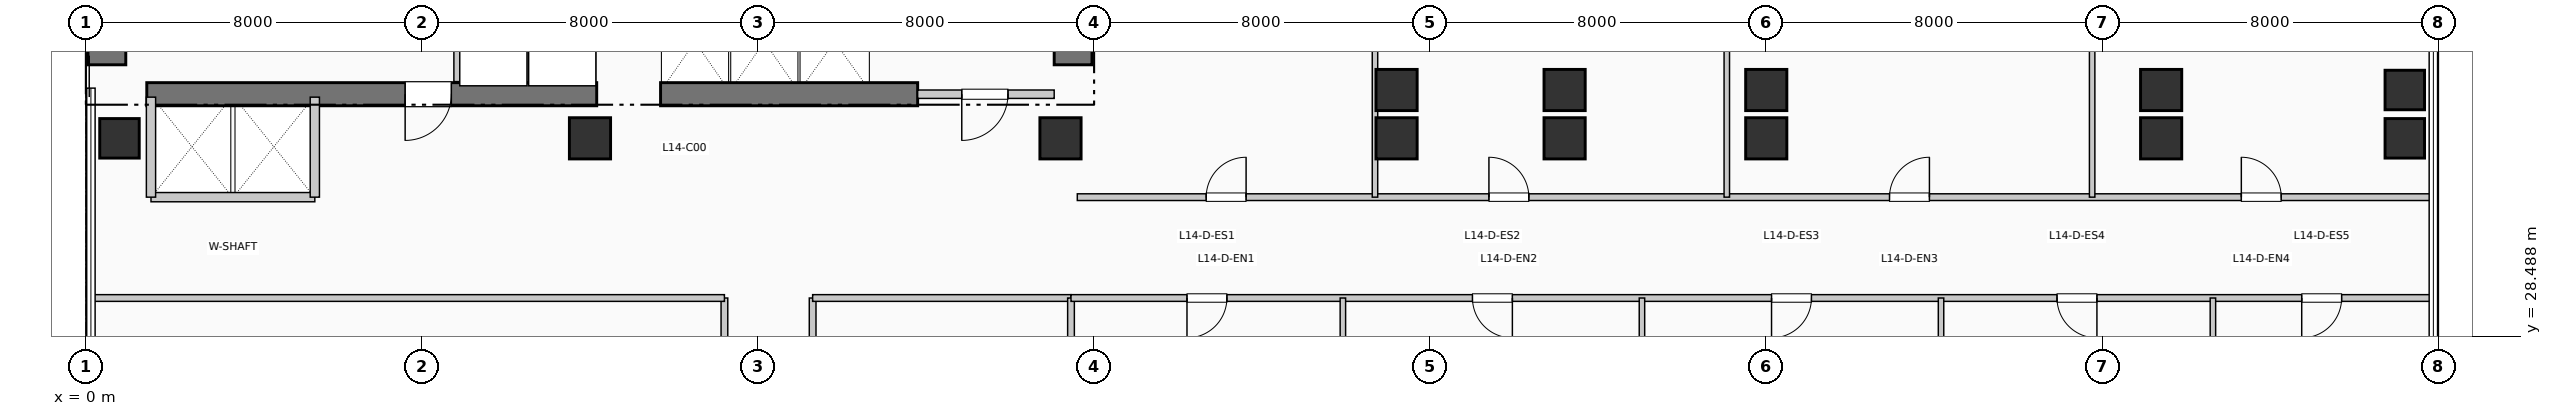
"""IFC4 building model, lengths in metres.
Left out: names, types, materials, properties, quantities, classifications, styles, units other than length and angle.
Written with IfcOpenShell. Run it as: python <this file> out.ifc"""

import sys

from ifc_helpers import new_model, si_unit, direction, frame, frame_2d, origin, origin_2d, place, context, subcontext, project, spatial, rectangle, extrude, element, fill, save


model = new_model("IFC4")
c1 = context("Model", 3, precision=1e-05, world=origin(), true_north=direction((0.0, 1.0)))
c2 = subcontext(c1, "Body", "Model", "MODEL_VIEW")
j1 = project(units=[si_unit("LENGTHUNIT", "METRE"), si_unit("PLANEANGLEUNIT", "RADIAN")], contexts=[c1])
p1 = place(None, origin())
s1 = spatial("IfcSite", under=j1, at=p1, CompositionType="ELEMENT")
p2 = place(p1, origin())
s2 = spatial("IfcBuilding", under=s1, at=p2, CompositionType="ELEMENT")
p3 = place(p2, frame((0.0, 0.0, 62.04)))
s3 = spatial("IfcBuildingStorey", under=s2, at=p3, CompositionType="ELEMENT", Elevation=62.04)
p4 = place(p3, frame((0.5, 34.95, 0.0), z_axis=(0.0, 0.0, 1.0), x_axis=(0.0, 1.0, 0.0)))
e1 = element("IfcWall", 1, at=p4, inside=s3, PredefinedType="SHEAR", context=c2, shape_type="SweptSolid", body=[
    extrude(rectangle(XDim=7.9, YDim=0.9, at=frame_2d((3.95, 0.0))), origin(), (0.0, 0.0, 1.0), 3.96),
])
p5 = place(p3, frame((23.5, 34.95, 0.0), z_axis=(0.0, 0.0, 1.0), x_axis=(0.0, 1.0, 0.0)))
e2 = element("IfcWall", 2, at=p5, inside=s3, PredefinedType="SHEAR", context=c2, shape_type="SweptSolid", body=[
    extrude(rectangle(XDim=10.64, YDim=0.9, at=frame_2d((5.32, 0.0))), origin(), (0.0, 0.0, 1.0), 3.96),
])
p6 = place(p3, frame((1.45, 34.25, 0.0), z_axis=(0.0, 0.0, 1.0), x_axis=(1.0, 0.0, 0.0)))
e3 = element("IfcWall", 3, at=p6, inside=s3, PredefinedType="SHEAR", context=c2, shape_type="SweptSolid", body=[
    extrude(rectangle(XDim=10.71, YDim=0.55, at=frame_2d((5.355, 0.0))), origin(), (0.0, 0.0, 1.0), 3.96),
])
p7 = place(p6, frame((7.25, 0.0, 0.0), z_axis=(0.0, 0.0, 1.0), x_axis=(-1.0, 0.0, 0.0)))
e4 = element("IfcOpeningElement", 4, at=p7, cuts=e3, PredefinedType="OPENING", context=c2, shape_type="SweptSolid", body=[
    extrude(rectangle(XDim=1.1, YDim=2.15, at=frame_2d((0.55, 1.075))), frame((0.0, 0.285, 0.0), z_axis=(0.0, -1.0, 0.0), x_axis=(1.0, 0.0, 0.0)), (0.0, 0.0, 1.0), 0.57),
])
p8 = place(p3, frame((13.68, 34.25, 0.0), z_axis=(0.0, 0.0, 1.0), x_axis=(1.0, 0.0, 0.0)))
e5 = element("IfcWall", 5, at=p8, inside=s3, PredefinedType="SHEAR", context=c2, shape_type="SweptSolid", body=[
    extrude(rectangle(XDim=6.12, YDim=0.55, at=frame_2d((3.06, 0.0))), origin(), (0.0, 0.0, 1.0), 3.96),
])
p9 = place(p3, frame((0.8, 33.2, 0.0), z_axis=(0.0, 0.0, 1.0), x_axis=(1.0, 0.0, 0.0)))
e6 = element("IfcColumn", 6, at=p9, inside=s3, PredefinedType="COLUMN", context=c2, shape_type="SweptSolid", body=[
    extrude(rectangle(XDim=0.94, YDim=0.94, at=origin_2d()), origin(), (0.0, 0.0, 1.0), 3.96),
])
for number, where, z_axis, x_axis in (
    (7, (12.0, 33.2, 0.0), (0.0, 0.0, 1.0), (1.0, 0.0, 0.0)),
    (8, (23.2, 33.2, 0.0), (0.0, 0.0, 1.0), (1.0, 0.0, 0.0)),
    (9, (31.2, 33.2, 0.0), (0.0, 0.0, 1.0), (1.0, 0.0, 0.0)),
    (10, (31.2, 34.35, 0.0), (0.0, 0.0, 1.0), (1.0, 0.0, 0.0)),
    (11, (35.2, 33.2, 0.0), (0.0, 0.0, 1.0), (1.0, 0.0, 0.0)),
    (12, (35.2, 34.35, 0.0), (0.0, 0.0, 1.0), (1.0, 0.0, 0.0)),
    (13, (40.0, 33.2, 0.0), (0.0, 0.0, 1.0), (1.0, 0.0, 0.0)),
    (14, (40.0, 34.35, 0.0), (0.0, 0.0, 1.0), (1.0, 0.0, 0.0)),
    (15, (49.4, 33.2, 0.0), (0.0, 0.0, 1.0), (1.0, 0.0, 0.0)),
    (16, (49.4, 34.35, 0.0), (0.0, 0.0, 1.0), (1.0, 0.0, 0.0)),
):
    element("IfcColumn", number, at=place(p3, frame(where, z_axis=z_axis, x_axis=x_axis)), inside=s3, PredefinedType="COLUMN", context=c2, shape_type="SweptSolid", body=[
        extrude(rectangle(XDim=0.98, YDim=0.98, at=origin_2d()), origin(), (0.0, 0.0, 1.0), 3.96),
    ])
for number, where, z_axis, x_axis in (
    (17, (55.2, 33.2, 0.0), (0.0, 0.0, 1.0), (1.0, 0.0, 0.0)),
    (18, (55.2, 34.35, 0.0), (0.0, 0.0, 1.0), (1.0, 0.0, 0.0)),
):
    element("IfcColumn", number, at=place(p3, frame(where, z_axis=z_axis, x_axis=x_axis)), inside=s3, PredefinedType="COLUMN", context=c2, shape_type="SweptSolid", body=[
        extrude(rectangle(XDim=0.94, YDim=0.94, at=origin_2d()), origin(), (0.0, 0.0, 1.0), 3.96),
    ])
p10 = place(p3, frame((8.86, 34.55, 0.0), z_axis=(0.0, 0.0, 1.0), x_axis=(0.0, 1.0, 0.0)))
e19 = element("IfcWall", 19, at=p10, inside=s3, PredefinedType="PARTITIONING", context=c2, shape_type="SweptSolid", body=[
    extrude(rectangle(XDim=2.5, YDim=0.2, at=frame_2d((1.25, 0.0))), origin(), (0.0, 0.0, 1.0), 3.71),
])
p11 = place(p3, frame((19.8, 34.25, 0.0), z_axis=(0.0, 0.0, 1.0), x_axis=(1.0, 0.0, 0.0)))
e20 = element("IfcWall", 20, at=p11, inside=s3, PredefinedType="PARTITIONING", context=c2, shape_type="SweptSolid", body=[
    extrude(rectangle(XDim=3.25, YDim=0.2, at=frame_2d((1.625, 0.0))), origin(), (0.0, 0.0, 1.0), 3.71),
])
p12 = place(p11, frame((2.15, 0.0, 0.0), z_axis=(0.0, 0.0, 1.0), x_axis=(-1.0, 0.0, 0.0)))
e21 = element("IfcOpeningElement", 21, at=p12, cuts=e20, PredefinedType="OPENING", context=c2, shape_type="SweptSolid", body=[
    extrude(rectangle(XDim=1.1, YDim=2.15, at=frame_2d((0.55, 1.075))), frame((0.0, 0.11, 0.0), z_axis=(0.0, -1.0, 0.0), x_axis=(1.0, 0.0, 0.0)), (0.0, 0.0, 1.0), 0.22),
])
p13 = place(p3, frame((1.55, 31.8, 0.0), z_axis=(0.0, 0.0, 1.0), x_axis=(1.0, 0.0, 0.0)))
e22 = element("IfcWall", 22, at=p13, inside=s3, PredefinedType="PARTITIONING", context=c2, shape_type="SweptSolid", body=[
    extrude(rectangle(XDim=3.9, YDim=0.22, at=frame_2d((1.95, 0.0))), origin(), (0.0, 0.0, 1.0), 3.71),
])
for number, where, z_axis, x_axis in (
    (23, (1.55, 31.8, 0.0), (0.0, 0.0, 1.0), (0.0, 1.0, 0.0)),
    (24, (5.45, 31.8, 0.0), (0.0, 0.0, 1.0), (0.0, 1.0, 0.0)),
):
    element("IfcWall", number, at=place(p3, frame(where, z_axis=z_axis, x_axis=x_axis)), inside=s3, PredefinedType="PARTITIONING", context=c2, shape_type="SweptSolid", body=[
        extrude(rectangle(XDim=2.38, YDim=0.22, at=frame_2d((1.19, 0.0))), origin(), (0.0, 0.0, 1.0), 3.71),
    ])
p14 = place(p3, frame((15.2, 4.39, 0.0), z_axis=(0.0, 0.0, 1.0), x_axis=(0.0, 1.0, 0.0)))
e25 = element("IfcWall", 25, at=p14, inside=s3, PredefinedType="PARTITIONING", context=c2, shape_type="SweptSolid", body=[
    extrude(rectangle(XDim=25.01, YDim=0.16, at=frame_2d((12.505, 0.0))), origin(), (0.0, 0.0, 1.0), 3.71),
])
p15 = place(p14, frame((2.851, 0.0, 0.0), z_axis=(0.0, 0.0, 1.0), x_axis=(-1.0, 0.0, 0.0)))
e26 = element("IfcOpeningElement", 26, at=p15, cuts=e25, PredefinedType="OPENING", context=c2, shape_type="SweptSolid", body=[
    extrude(rectangle(XDim=0.95, YDim=2.15, at=frame_2d((0.475, 1.075))), frame((0.0, 0.09, 0.0), z_axis=(0.0, -1.0, 0.0), x_axis=(1.0, 0.0, 0.0)), (0.0, 0.0, 1.0), 0.18),
])
p16 = place(p14, frame((7.728, 0.0, 0.0), z_axis=(0.0, 0.0, 1.0), x_axis=(-1.0, 0.0, 0.0)))
e27 = element("IfcOpeningElement", 27, at=p16, cuts=e25, PredefinedType="OPENING", context=c2, shape_type="SweptSolid", body=[
    extrude(rectangle(XDim=0.95, YDim=2.15, at=frame_2d((0.475, 1.075))), frame((0.0, 0.09, 0.0), z_axis=(0.0, -1.0, 0.0), x_axis=(1.0, 0.0, 0.0)), (0.0, 0.0, 1.0), 0.18),
])
p17 = place(p14, frame((12.73, 0.0, 0.0), z_axis=(0.0, 0.0, 1.0), x_axis=(-1.0, 0.0, 0.0)))
e28 = element("IfcOpeningElement", 28, at=p17, cuts=e25, PredefinedType="OPENING", context=c2, shape_type="SweptSolid", body=[
    extrude(rectangle(XDim=0.95, YDim=2.15, at=frame_2d((0.475, 1.075))), frame((0.0, 0.09, 0.0), z_axis=(0.0, -1.0, 0.0), x_axis=(1.0, 0.0, 0.0)), (0.0, 0.0, 1.0), 0.18),
])
p18 = place(p14, frame((17.732, 0.0, 0.0), z_axis=(0.0, 0.0, 1.0), x_axis=(-1.0, 0.0, 0.0)))
e29 = element("IfcOpeningElement", 29, at=p18, cuts=e25, PredefinedType="OPENING", context=c2, shape_type="SweptSolid", body=[
    extrude(rectangle(XDim=0.95, YDim=2.15, at=frame_2d((0.475, 1.075))), frame((0.0, 0.09, 0.0), z_axis=(0.0, -1.0, 0.0), x_axis=(1.0, 0.0, 0.0)), (0.0, 0.0, 1.0), 0.18),
])
p19 = place(p14, frame((22.859, 0.0, 0.0), z_axis=(0.0, 0.0, 1.0), x_axis=(-1.0, 0.0, 0.0)))
e30 = element("IfcOpeningElement", 30, at=p19, cuts=e25, PredefinedType="OPENING", context=c2, shape_type="SweptSolid", body=[
    extrude(rectangle(XDim=0.95, YDim=2.15, at=frame_2d((0.475, 1.075))), frame((0.0, 0.09, 0.0), z_axis=(0.0, -1.0, 0.0), x_axis=(1.0, 0.0, 0.0)), (0.0, 0.0, 1.0), 0.18),
])
p20 = place(p3, frame((17.3, 4.39, 0.0), z_axis=(0.0, 0.0, 1.0), x_axis=(0.0, 1.0, 0.0)))
e31 = element("IfcWall", 31, at=p20, inside=s3, PredefinedType="PARTITIONING", context=c2, shape_type="SweptSolid", body=[
    extrude(rectangle(XDim=25.01, YDim=0.16, at=frame_2d((12.505, 0.0))), origin(), (0.0, 0.0, 1.0), 3.71),
])
p21 = place(p20, frame((5.778, 0.0, 0.0)))
e32 = element("IfcOpeningElement", 32, at=p21, cuts=e31, PredefinedType="OPENING", context=c2, shape_type="SweptSolid", body=[
    extrude(rectangle(XDim=0.95, YDim=2.15, at=frame_2d((0.475, 1.075))), frame((0.0, 0.09, 0.0), z_axis=(0.0, -1.0, 0.0), x_axis=(1.0, 0.0, 0.0)), (0.0, 0.0, 1.0), 0.18),
])
p22 = place(p20, frame((18.282, 0.0, 0.0)))
e33 = element("IfcOpeningElement", 33, at=p22, cuts=e31, PredefinedType="OPENING", context=c2, shape_type="SweptSolid", body=[
    extrude(rectangle(XDim=0.95, YDim=2.15, at=frame_2d((0.475, 1.075))), frame((0.0, 0.09, 0.0), z_axis=(0.0, -1.0, 0.0), x_axis=(1.0, 0.0, 0.0)), (0.0, 0.0, 1.0), 0.18),
])
p23 = place(p3, frame((0.19, 29.4, 0.0), z_axis=(0.0, 0.0, 1.0), x_axis=(1.0, 0.0, 0.0)))
e34 = element("IfcWall", 34, at=p23, inside=s3, PredefinedType="PARTITIONING", context=c2, shape_type="SweptSolid", body=[
    extrude(rectangle(XDim=15.01, YDim=0.16, at=frame_2d((7.505, 0.0))), origin(), (0.0, 0.0, 1.0), 3.365),
])
p24 = place(p3, frame((17.3, 29.4, 0.0), z_axis=(0.0, 0.0, 1.0), x_axis=(1.0, 0.0, 0.0)))
e35 = element("IfcWall", 35, at=p24, inside=s3, PredefinedType="PARTITIONING", context=c2, shape_type="SweptSolid", body=[
    extrude(rectangle(XDim=6.15, YDim=0.16, at=frame_2d((3.075, 0.0))), origin(), (0.0, 0.0, 1.0), 3.71),
])
p25 = place(p3, frame((23.45, 0.19, 0.0), z_axis=(0.0, 0.0, 1.0), x_axis=(0.0, 1.0, 0.0)))
e36 = element("IfcWall", 36, at=p25, inside=s3, PredefinedType="PARTITIONING", context=c2, shape_type="SweptSolid", body=[
    extrude(rectangle(XDim=29.21, YDim=0.16, at=frame_2d((14.605, 0.0))), origin(), (0.0, 0.0, 1.0), 2.995),
])
p26 = place(p3, frame((23.45, 29.4, 0.0), z_axis=(0.0, 0.0, 1.0), x_axis=(1.0, 0.0, 0.0)))
e37 = element("IfcWall", 37, at=p26, inside=s3, PredefinedType="PARTITIONING", context=c2, shape_type="SweptSolid", body=[
    extrude(rectangle(XDim=32.36, YDim=0.16, at=frame_2d((16.18, 0.0))), origin(), (0.0, 0.0, 1.0), 3.365),
])
p27 = place(p26, frame((3.711, 0.0, 0.0), z_axis=(0.0, 0.0, 1.0), x_axis=(-1.0, 0.0, 0.0)))
e38 = element("IfcOpeningElement", 38, at=p27, cuts=e37, PredefinedType="OPENING", context=c2, shape_type="SweptSolid", body=[
    extrude(rectangle(XDim=0.95, YDim=2.15, at=frame_2d((0.475, 1.075))), frame((0.0, 0.09, 0.0), z_axis=(0.0, -1.0, 0.0), x_axis=(1.0, 0.0, 0.0)), (0.0, 0.0, 1.0), 0.18),
])
p28 = place(p26, frame((10.507, 0.0, 0.0), z_axis=(0.0, 0.0, 1.0), x_axis=(-1.0, 0.0, 0.0)))
e39 = element("IfcOpeningElement", 39, at=p28, cuts=e37, PredefinedType="OPENING", context=c2, shape_type="SweptSolid", body=[
    extrude(rectangle(XDim=0.95, YDim=2.15, at=frame_2d((0.475, 1.075))), frame((0.0, 0.09, 0.0), z_axis=(0.0, -1.0, 0.0), x_axis=(1.0, 0.0, 0.0)), (0.0, 0.0, 1.0), 0.18),
])
p29 = place(p26, frame((17.626, 0.0, 0.0), z_axis=(0.0, 0.0, 1.0), x_axis=(-1.0, 0.0, 0.0)))
e40 = element("IfcOpeningElement", 40, at=p29, cuts=e37, PredefinedType="OPENING", context=c2, shape_type="SweptSolid", body=[
    extrude(rectangle(XDim=0.95, YDim=2.15, at=frame_2d((0.475, 1.075))), frame((0.0, 0.09, 0.0), z_axis=(0.0, -1.0, 0.0), x_axis=(1.0, 0.0, 0.0)), (0.0, 0.0, 1.0), 0.18),
])
p30 = place(p26, frame((24.421, 0.0, 0.0), z_axis=(0.0, 0.0, 1.0), x_axis=(-1.0, 0.0, 0.0)))
e41 = element("IfcOpeningElement", 41, at=p30, cuts=e37, PredefinedType="OPENING", context=c2, shape_type="SweptSolid", body=[
    extrude(rectangle(XDim=0.95, YDim=2.15, at=frame_2d((0.475, 1.075))), frame((0.0, 0.09, 0.0), z_axis=(0.0, -1.0, 0.0), x_axis=(1.0, 0.0, 0.0)), (0.0, 0.0, 1.0), 0.18),
])
p31 = place(p26, frame((30.246, 0.0, 0.0), z_axis=(0.0, 0.0, 1.0), x_axis=(-1.0, 0.0, 0.0)))
e42 = element("IfcOpeningElement", 42, at=p31, cuts=e37, PredefinedType="OPENING", context=c2, shape_type="SweptSolid", body=[
    extrude(rectangle(XDim=0.95, YDim=2.15, at=frame_2d((0.475, 1.075))), frame((0.0, 0.09, 0.0), z_axis=(0.0, -1.0, 0.0), x_axis=(1.0, 0.0, 0.0)), (0.0, 0.0, 1.0), 0.18),
])
p32 = place(p3, frame((23.6, 31.8, 0.0), z_axis=(0.0, 0.0, 1.0), x_axis=(1.0, 0.0, 0.0)))
e43 = element("IfcWall", 43, at=p32, inside=s3, PredefinedType="PARTITIONING", context=c2, shape_type="SweptSolid", body=[
    extrude(rectangle(XDim=32.21, YDim=0.16, at=frame_2d((16.105, 0.0))), origin(), (0.0, 0.0, 1.0), 3.71),
])
p33 = place(p32, frame((3.068, 0.0, 0.0)))
e44 = element("IfcOpeningElement", 44, at=p33, cuts=e43, PredefinedType="OPENING", context=c2, shape_type="SweptSolid", body=[
    extrude(rectangle(XDim=0.95, YDim=2.15, at=frame_2d((0.475, 1.075))), frame((0.0, 0.09, 0.0), z_axis=(0.0, -1.0, 0.0), x_axis=(1.0, 0.0, 0.0)), (0.0, 0.0, 1.0), 0.18),
])
p34 = place(p32, frame((9.799, 0.0, 0.0)))
e45 = element("IfcOpeningElement", 45, at=p34, cuts=e43, PredefinedType="OPENING", context=c2, shape_type="SweptSolid", body=[
    extrude(rectangle(XDim=0.95, YDim=2.15, at=frame_2d((0.475, 1.075))), frame((0.0, 0.09, 0.0), z_axis=(0.0, -1.0, 0.0), x_axis=(1.0, 0.0, 0.0)), (0.0, 0.0, 1.0), 0.18),
])
p35 = place(p32, frame((19.334, 0.0, 0.0)))
e46 = element("IfcOpeningElement", 46, at=p35, cuts=e43, PredefinedType="OPENING", context=c2, shape_type="SweptSolid", body=[
    extrude(rectangle(XDim=0.95, YDim=2.15, at=frame_2d((0.475, 1.075))), frame((0.0, 0.09, 0.0), z_axis=(0.0, -1.0, 0.0), x_axis=(1.0, 0.0, 0.0)), (0.0, 0.0, 1.0), 0.18),
])
p36 = place(p32, frame((27.709, 0.0, 0.0)))
e47 = element("IfcOpeningElement", 47, at=p36, cuts=e43, PredefinedType="OPENING", context=c2, shape_type="SweptSolid", body=[
    extrude(rectangle(XDim=0.95, YDim=2.15, at=frame_2d((0.475, 1.075))), frame((0.0, 0.09, 0.0), z_axis=(0.0, -1.0, 0.0), x_axis=(1.0, 0.0, 0.0)), (0.0, 0.0, 1.0), 0.18),
])
for number, where, z_axis, x_axis in (
    (48, (29.922, 18.19, 0.0), (0.0, 0.0, 1.0), (0.0, 1.0, 0.0)),
    (49, (37.041, 18.19, 0.0), (0.0, 0.0, 1.0), (0.0, 1.0, 0.0)),
    (50, (44.16, 18.19, 0.0), (0.0, 0.0, 1.0), (0.0, 1.0, 0.0)),
    (51, (50.632, 18.19, 0.0), (0.0, 0.0, 1.0), (0.0, 1.0, 0.0)),
):
    element("IfcWall", number, at=place(p3, frame(where, z_axis=z_axis, x_axis=x_axis)), inside=s3, PredefinedType="PARTITIONING", context=c2, shape_type="SweptSolid", body=[
        extrude(rectangle(XDim=11.21, YDim=0.13, at=frame_2d((5.605, 0.0))), origin(), (0.0, 0.0, 1.0), 3.71),
    ])
for number, where, z_axis, x_axis in (
    (52, (30.686, 31.8, 0.0), (0.0, 0.0, 1.0), (0.0, 1.0, 0.0)),
    (53, (39.061, 31.8, 0.0), (0.0, 0.0, 1.0), (0.0, 1.0, 0.0)),
    (54, (47.758, 31.8, 0.0), (0.0, 0.0, 1.0), (0.0, 1.0, 0.0)),
):
    element("IfcWall", number, at=place(p3, frame(where, z_axis=z_axis, x_axis=x_axis)), inside=s3, PredefinedType="PARTITIONING", context=c2, shape_type="SweptSolid", body=[
        extrude(rectangle(XDim=14.01, YDim=0.13, at=frame_2d((7.005, 0.0))), origin(), (0.0, 0.0, 1.0), 3.71),
    ])
p37 = place(p7, origin())
e55 = element("IfcDoor", 55, at=p37, inside=s3, OperationType="SINGLE_SWING_LEFT", PredefinedType="DOOR", context=c2, shape_type="SweptSolid", body=[
    extrude(rectangle(XDim=1.1, YDim=2.15, at=frame_2d((0.55, 1.075))), frame((0.0, 0.025, 0.0), z_axis=(0.0, -1.0, 0.0), x_axis=(1.0, 0.0, 0.0)), (0.0, 0.0, 1.0), 0.05),
])
fill(e4, e55)
p38 = place(p12, origin())
e56 = element("IfcDoor", 56, at=p38, inside=s3, OperationType="SINGLE_SWING_LEFT", PredefinedType="DOOR", context=c2, shape_type="SweptSolid", body=[
    extrude(rectangle(XDim=1.1, YDim=2.15, at=frame_2d((0.55, 1.075))), frame((0.0, 0.025, 0.0), z_axis=(0.0, -1.0, 0.0), x_axis=(1.0, 0.0, 0.0)), (0.0, 0.0, 1.0), 0.05),
])
fill(e21, e56)
p39 = place(p27, origin())
e57 = element("IfcDoor", 57, at=p39, inside=s3, OperationType="SINGLE_SWING_LEFT", PredefinedType="DOOR", context=c2, shape_type="SweptSolid", body=[
    extrude(rectangle(XDim=0.95, YDim=2.15, at=frame_2d((0.475, 1.075))), frame((0.0, 0.025, 0.0), z_axis=(0.0, -1.0, 0.0), x_axis=(1.0, 0.0, 0.0)), (0.0, 0.0, 1.0), 0.05),
])
fill(e38, e57)
p40 = place(p28, origin())
e58 = element("IfcDoor", 58, at=p40, inside=s3, OperationType="SINGLE_SWING_RIGHT", PredefinedType="DOOR", context=c2, shape_type="SweptSolid", body=[
    extrude(rectangle(XDim=0.95, YDim=2.15, at=frame_2d((0.475, 1.075))), frame((0.0, 0.025, 0.0), z_axis=(0.0, -1.0, 0.0), x_axis=(1.0, 0.0, 0.0)), (0.0, 0.0, 1.0), 0.05),
])
fill(e39, e58)
p41 = place(p29, origin())
e59 = element("IfcDoor", 59, at=p41, inside=s3, OperationType="SINGLE_SWING_LEFT", PredefinedType="DOOR", context=c2, shape_type="SweptSolid", body=[
    extrude(rectangle(XDim=0.95, YDim=2.15, at=frame_2d((0.475, 1.075))), frame((0.0, 0.025, 0.0), z_axis=(0.0, -1.0, 0.0), x_axis=(1.0, 0.0, 0.0)), (0.0, 0.0, 1.0), 0.05),
])
fill(e40, e59)
p42 = place(p30, origin())
e60 = element("IfcDoor", 60, at=p42, inside=s3, OperationType="SINGLE_SWING_RIGHT", PredefinedType="DOOR", context=c2, shape_type="SweptSolid", body=[
    extrude(rectangle(XDim=0.95, YDim=2.15, at=frame_2d((0.475, 1.075))), frame((0.0, 0.025, 0.0), z_axis=(0.0, -1.0, 0.0), x_axis=(1.0, 0.0, 0.0)), (0.0, 0.0, 1.0), 0.05),
])
fill(e41, e60)
p43 = place(p31, origin())
e61 = element("IfcDoor", 61, at=p43, inside=s3, OperationType="SINGLE_SWING_LEFT", PredefinedType="DOOR", context=c2, shape_type="SweptSolid", body=[
    extrude(rectangle(XDim=0.95, YDim=2.15, at=frame_2d((0.475, 1.075))), frame((0.0, 0.025, 0.0), z_axis=(0.0, -1.0, 0.0), x_axis=(1.0, 0.0, 0.0)), (0.0, 0.0, 1.0), 0.05),
])
fill(e42, e61)
p44 = place(p33, origin())
e62 = element("IfcDoor", 62, at=p44, inside=s3, OperationType="SINGLE_SWING_RIGHT", PredefinedType="DOOR", context=c2, shape_type="SweptSolid", body=[
    extrude(rectangle(XDim=0.95, YDim=2.15, at=frame_2d((0.475, 1.075))), frame((0.0, 0.025, 0.0), z_axis=(0.0, -1.0, 0.0), x_axis=(1.0, 0.0, 0.0)), (0.0, 0.0, 1.0), 0.05),
])
fill(e44, e62)
p45 = place(p34, origin())
e63 = element("IfcDoor", 63, at=p45, inside=s3, OperationType="SINGLE_SWING_LEFT", PredefinedType="DOOR", context=c2, shape_type="SweptSolid", body=[
    extrude(rectangle(XDim=0.95, YDim=2.15, at=frame_2d((0.475, 1.075))), frame((0.0, 0.025, 0.0), z_axis=(0.0, -1.0, 0.0), x_axis=(1.0, 0.0, 0.0)), (0.0, 0.0, 1.0), 0.05),
])
fill(e45, e63)
p46 = place(p35, origin())
e64 = element("IfcDoor", 64, at=p46, inside=s3, OperationType="SINGLE_SWING_RIGHT", PredefinedType="DOOR", context=c2, shape_type="SweptSolid", body=[
    extrude(rectangle(XDim=0.95, YDim=2.15, at=frame_2d((0.475, 1.075))), frame((0.0, 0.025, 0.0), z_axis=(0.0, -1.0, 0.0), x_axis=(1.0, 0.0, 0.0)), (0.0, 0.0, 1.0), 0.05),
])
fill(e46, e64)
p47 = place(p36, origin())
e65 = element("IfcDoor", 65, at=p47, inside=s3, OperationType="SINGLE_SWING_LEFT", PredefinedType="DOOR", context=c2, shape_type="SweptSolid", body=[
    extrude(rectangle(XDim=0.95, YDim=2.15, at=frame_2d((0.475, 1.075))), frame((0.0, 0.025, 0.0), z_axis=(0.0, -1.0, 0.0), x_axis=(1.0, 0.0, 0.0)), (0.0, 0.0, 1.0), 0.05),
])
fill(e47, e65)
save(model, sys.argv[1])
